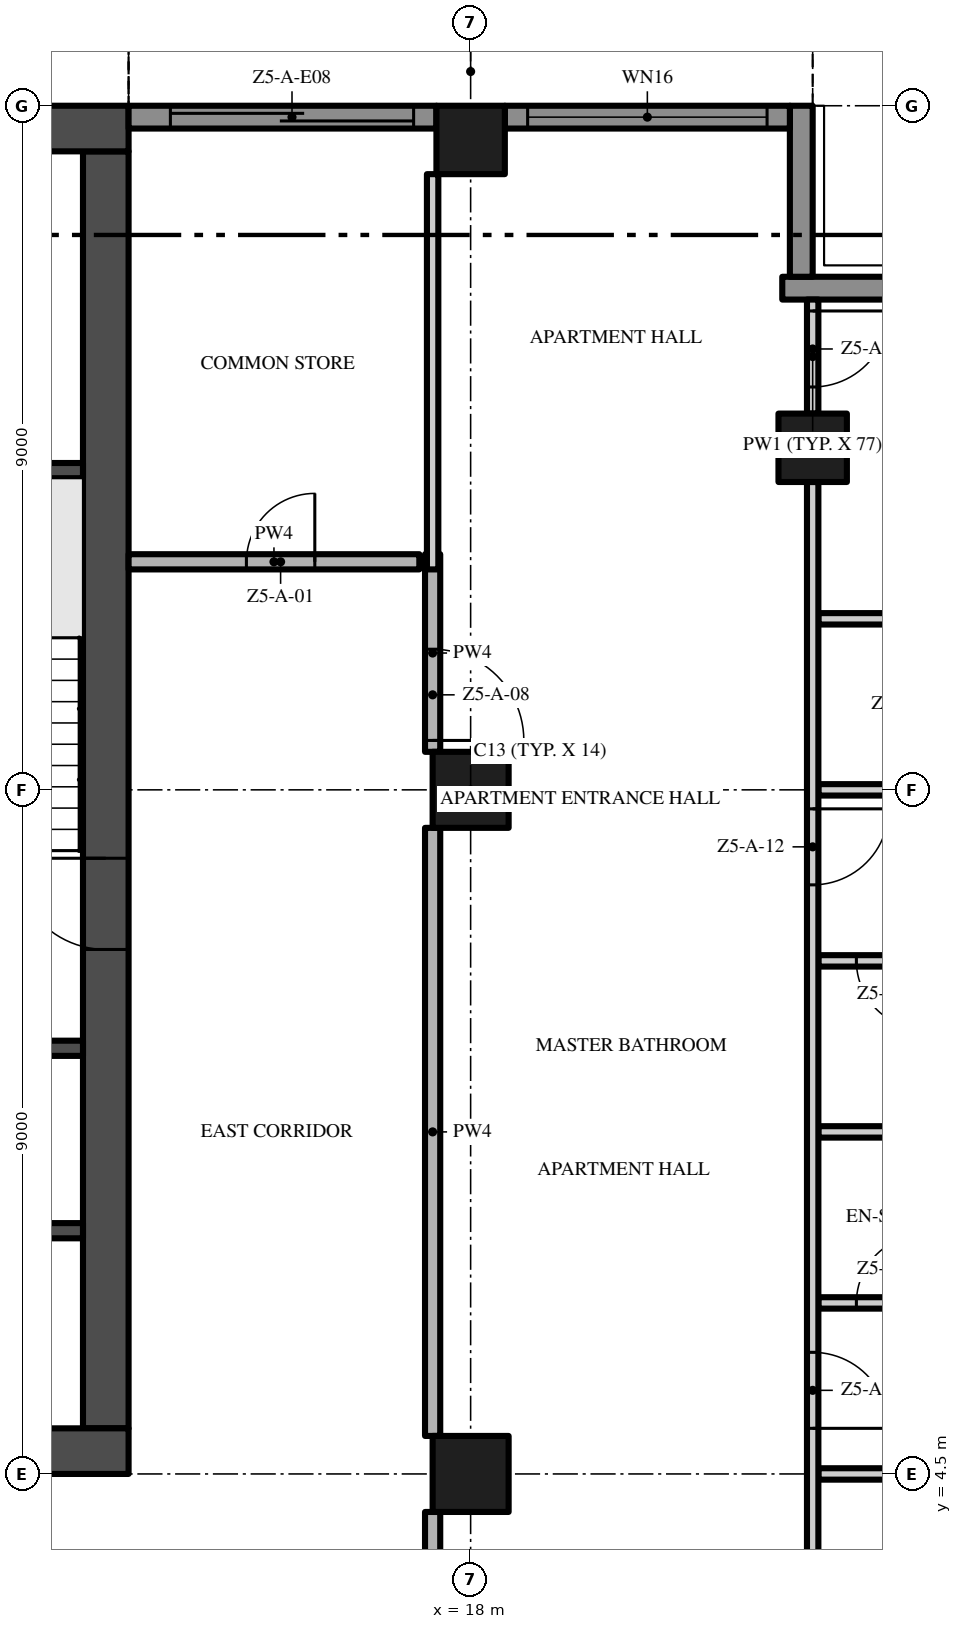
"""IFC4 building model, lengths in metres.
Left out: names, types, materials, properties, quantities, classifications, styles, units other than length and angle.
Written with IfcOpenShell. Run it as: python <this file> out.ifc"""

import sys

from ifc_helpers import new_model, si_unit, direction, frame, frame_2d, origin, origin_2d, place, context, subcontext, project, spatial, rectangle, extrude, element, fill, save


model = new_model("IFC4")
c1 = context("Model", 3, precision=1e-05, world=origin(), true_north=direction((0.0, 1.0)))
c2 = subcontext(c1, "Body", "Model", "MODEL_VIEW")
j1 = project(units=[si_unit("LENGTHUNIT", "METRE"), si_unit("PLANEANGLEUNIT", "RADIAN")], contexts=[c1])
p1 = place(None, origin())
s1 = spatial("IfcSite", under=j1, at=p1, CompositionType="ELEMENT")
p2 = place(p1, origin())
s2 = spatial("IfcBuilding", under=s1, at=p2, CompositionType="ELEMENT")
p3 = place(p2, frame((0.0, 0.0, 238.8)))
s3 = spatial("IfcBuildingStorey", under=s2, at=p3, CompositionType="ELEMENT", Elevation=238.8)
p4 = place(p3, frame((-13.5, 4.8, -0.3), z_axis=(0.0, 0.0, 1.0), x_axis=(1.0, 0.0, 0.0)))
e1 = element("IfcWall", 1, at=p4, inside=s3, PredefinedType="SHEAR", context=c2, shape_type="SweptSolid", body=[
    extrude(rectangle(XDim=27.0, YDim=0.6, at=frame_2d((13.5, 0.0))), origin(), (0.0, 0.0, 1.0), 3.8),
])
p5 = place(p4, frame((12.0, 0.0, 0.3)))
e2 = element("IfcOpeningElement", 2, at=p5, cuts=e1, PredefinedType="OPENING", context=c2, shape_type="SweptSolid", body=[
    extrude(rectangle(XDim=3.0, YDim=2.4, at=frame_2d((1.5, 1.2))), frame((0.0, 0.31, 0.0), z_axis=(0.0, -1.0, 0.0), x_axis=(1.0, 0.0, 0.0)), (0.0, 0.0, 1.0), 0.62),
])
p6 = place(p4, frame((4.9, 0.0, 0.3)))
e3 = element("IfcOpeningElement", 3, at=p6, cuts=e1, PredefinedType="OPENING", context=c2, shape_type="SweptSolid", body=[
    extrude(rectangle(XDim=1.2, YDim=2.2, at=frame_2d((0.6, 1.1))), frame((0.0, 0.31, 0.0), z_axis=(0.0, -1.0, 0.0), x_axis=(1.0, 0.0, 0.0)), (0.0, 0.0, 1.0), 0.62),
])
p7 = place(p4, frame((20.75, 0.0, 0.3)))
e4 = element("IfcOpeningElement", 4, at=p7, cuts=e1, PredefinedType="OPENING", context=c2, shape_type="SweptSolid", body=[
    extrude(rectangle(XDim=1.5, YDim=2.2, at=frame_2d((0.75, 1.1))), frame((0.0, 0.31, 0.0), z_axis=(0.0, -1.0, 0.0), x_axis=(1.0, 0.0, 0.0)), (0.0, 0.0, 1.0), 0.62),
])
p8 = place(p4, frame((17.4, 0.0, 0.3)))
e5 = element("IfcOpeningElement", 5, at=p8, cuts=e1, PredefinedType="OPENING", context=c2, shape_type="SweptSolid", body=[
    extrude(rectangle(XDim=1.2, YDim=2.2, at=frame_2d((0.6, 1.1))), frame((0.0, 0.31, 0.0), z_axis=(0.0, -1.0, 0.0), x_axis=(1.0, 0.0, 0.0)), (0.0, 0.0, 1.0), 0.62),
])
p9 = place(p3, frame((13.2, 5.1, -0.3), z_axis=(0.0, 0.0, 1.0), x_axis=(0.0, 1.0, 0.0)))
e6 = element("IfcWall", 6, at=p9, inside=s3, PredefinedType="SHEAR", context=c2, shape_type="SweptSolid", body=[
    extrude(rectangle(XDim=16.8, YDim=0.6, at=frame_2d((8.4, 0.0))), origin(), (0.0, 0.0, 1.0), 3.8),
])
p10 = place(p9, frame((6.3, 0.0, 0.3)))
e7 = element("IfcOpeningElement", 7, at=p10, cuts=e6, PredefinedType="OPENING", context=c2, shape_type="SweptSolid", body=[
    extrude(rectangle(XDim=1.2, YDim=2.2, at=frame_2d((0.6, 1.1))), frame((0.0, 0.31, 0.0), z_axis=(0.0, -1.0, 0.0), x_axis=(1.0, 0.0, 0.0)), (0.0, 0.0, 1.0), 0.62),
])
p11 = place(p3, frame((13.5, 22.2, -0.3), z_axis=(0.0, 0.0, 1.0), x_axis=(-1.0, 0.0, 0.0)))
e8 = element("IfcWall", 8, at=p11, inside=s3, PredefinedType="SHEAR", context=c2, shape_type="SweptSolid", body=[
    extrude(rectangle(XDim=27.0, YDim=0.6, at=frame_2d((13.5, 0.0))), origin(), (0.0, 0.0, 1.0), 3.8),
])
p12 = place(p3, frame((18.0, 13.5, 0.0), z_axis=(0.0, 0.0, 1.0), x_axis=(1.0, 0.0, 0.0)))
e9 = element("IfcColumn", 9, at=p12, inside=s3, PredefinedType="COLUMN", context=c2, shape_type="SweptSolid", body=[
    extrude(rectangle(XDim=1.0, YDim=1.0, at=origin_2d()), origin(), (0.0, 0.0, 1.0), 3.5),
])
p13 = place(p3, frame((18.0, 22.05, 0.0), z_axis=(0.0, 0.0, 1.0), x_axis=(1.0, 0.0, 0.0)))
e10 = element("IfcColumn", 10, at=p13, inside=s3, PredefinedType="COLUMN", context=c2, shape_type="SweptSolid", body=[
    extrude(rectangle(XDim=0.9, YDim=0.9, at=origin_2d()), origin(), (0.0, 0.0, 1.0), 3.5),
])
p14 = place(p3, frame((18.0, 4.5, 0.0), z_axis=(0.0, 0.0, 1.0), x_axis=(1.0, 0.0, 0.0)))
e11 = element("IfcColumn", 11, at=p14, inside=s3, PredefinedType="COLUMN", context=c2, shape_type="SweptSolid", body=[
    extrude(rectangle(XDim=1.0, YDim=1.0, at=origin_2d()), origin(), (0.0, 0.0, 1.0), 3.5),
])
p15 = place(p3, frame((22.5, 18.0, 0.0), z_axis=(0.0, 0.0, 1.0), x_axis=(1.0, 0.0, 0.0)))
e12 = element("IfcColumn", 12, at=p15, inside=s3, PredefinedType="COLUMN", context=c2, shape_type="SweptSolid", body=[
    extrude(rectangle(XDim=0.9, YDim=0.9, at=origin_2d()), origin(), (0.0, 0.0, 1.0), 3.5),
])
p16 = place(p3, frame((22.1, 20.1, 0.0), z_axis=(0.0, 0.0, 1.0), x_axis=(1.0, 0.0, 0.0)))
e13 = element("IfcWall", 13, at=p16, inside=s3, PredefinedType="SOLIDWALL", context=c2, shape_type="SweptSolid", body=[
    extrude(rectangle(XDim=2.35, YDim=0.3, at=frame_2d((1.175, 0.0))), origin(), (0.0, 0.0, 1.0), 3.5),
])
p17 = place(p3, frame((22.35, 22.5, 0.0), z_axis=(0.0, 0.0, 1.0), x_axis=(0.0, -1.0, 0.0)))
e14 = element("IfcWall", 14, at=p17, inside=s3, PredefinedType="SOLIDWALL", context=c2, shape_type="SweptSolid", body=[
    extrude(rectangle(XDim=2.25, YDim=0.3, at=frame_2d((1.125, 0.0))), origin(), (0.0, 0.0, 1.0), 3.5),
])
p18 = place(p3, frame((18.45, 22.35, 0.0), z_axis=(0.0, 0.0, 1.0), x_axis=(1.0, 0.0, 0.0)))
e15 = element("IfcWall", 15, at=p18, inside=s3, PredefinedType="SOLIDWALL", context=c2, shape_type="SweptSolid", body=[
    extrude(rectangle(XDim=3.75, YDim=0.3, at=frame_2d((1.875, 0.0))), origin(), (0.0, 0.0, 1.0), 3.5),
])
p19 = place(p18, frame((0.3, 0.0, 0.45)))
e16 = element("IfcOpeningElement", 16, at=p19, cuts=e15, PredefinedType="OPENING", context=c2, shape_type="SweptSolid", body=[
    extrude(rectangle(XDim=3.15, YDim=2.65, at=frame_2d((1.575, 1.325))), frame((0.0, 0.16, 0.0), z_axis=(0.0, -1.0, 0.0), x_axis=(1.0, 0.0, 0.0)), (0.0, 0.0, 1.0), 0.32),
])
p20 = place(p3, frame((13.5, 22.35, 0.0), z_axis=(0.0, 0.0, 1.0), x_axis=(1.0, 0.0, 0.0)))
e17 = element("IfcWall", 17, at=p20, inside=s3, PredefinedType="SOLIDWALL", context=c2, shape_type="SweptSolid", body=[
    extrude(rectangle(XDim=4.05, YDim=0.3, at=frame_2d((2.025, 0.0))), origin(), (0.0, 0.0, 1.0), 3.5),
])
p21 = place(p20, frame((0.55, 0.0, 0.0)))
e18 = element("IfcOpeningElement", 18, at=p21, cuts=e17, PredefinedType="OPENING", context=c2, shape_type="SweptSolid", body=[
    extrude(rectangle(XDim=3.2, YDim=2.4, at=frame_2d((1.6, 1.2))), frame((0.0, 0.16, 0.0), z_axis=(0.0, -1.0, 0.0), x_axis=(1.0, 0.0, 0.0)), (0.0, 0.0, 1.0), 0.32),
])
for number, where, z_axis, x_axis in (
    (19, (9.65, 7.7, 0.0), (0.0, 0.0, 1.0), (1.0, 0.0, 0.0)),
    (20, (9.65, 10.1, 0.0), (0.0, 0.0, 1.0), (1.0, 0.0, 0.0)),
    (21, (9.65, 17.7, 0.0), (0.0, 0.0, 1.0), (1.0, 0.0, 0.0)),
):
    element("IfcWall", number, at=place(p3, frame(where, z_axis=z_axis, x_axis=x_axis)), inside=s3, PredefinedType="SHEAR", context=c2, shape_type="SweptSolid", body=[
        extrude(rectangle(XDim=3.25, YDim=0.2, at=frame_2d((1.625, 0.0))), origin(), (0.0, 0.0, 1.0), 3.5),
    ])
p22 = place(p3, frame((22.575, 4.5, 0.0), z_axis=(0.0, 0.0, 1.0), x_axis=(1.0, 0.0, 0.0)))
e22 = element("IfcWall", 22, at=p22, inside=s3, PredefinedType="PARTITIONING", context=c2, shape_type="SweptSolid", body=[
    extrude(rectangle(XDim=3.525, YDim=0.15, at=frame_2d((1.762, 0.0))), origin(), (0.0, 0.0, 1.0), 3.5),
])
p23 = place(p3, frame((22.575, 6.75, 0.0), z_axis=(0.0, 0.0, 1.0), x_axis=(1.0, 0.0, 0.0)))
e23 = element("IfcWall", 23, at=p23, inside=s3, PredefinedType="PARTITIONING", context=c2, shape_type="SweptSolid", body=[
    extrude(rectangle(XDim=1.875, YDim=0.15, at=frame_2d((0.938, 0.0))), origin(), (0.0, 0.0, 1.0), 3.5),
])
p24 = place(p23, frame((0.5, 0.0, 0.0)))
e24 = element("IfcOpeningElement", 24, at=p24, cuts=e23, PredefinedType="OPENING", context=c2, shape_type="SweptSolid", body=[
    extrude(rectangle(XDim=0.9, YDim=2.1, at=frame_2d((0.45, 1.05))), frame((0.0, 0.085, 0.0), z_axis=(0.0, -1.0, 0.0), x_axis=(1.0, 0.0, 0.0)), (0.0, 0.0, 1.0), 0.17),
])
p25 = place(p3, frame((22.575, 9.0, 0.0), z_axis=(0.0, 0.0, 1.0), x_axis=(1.0, 0.0, 0.0)))
e25 = element("IfcWall", 25, at=p25, inside=s3, PredefinedType="PARTITIONING", context=c2, shape_type="SweptSolid", body=[
    extrude(rectangle(XDim=1.875, YDim=0.15, at=frame_2d((0.938, 0.0))), origin(), (0.0, 0.0, 1.0), 3.5),
])
p26 = place(p3, frame((24.45, 11.25, 0.0), z_axis=(0.0, 0.0, 1.0), x_axis=(-1.0, 0.0, 0.0)))
e26 = element("IfcWall", 26, at=p26, inside=s3, PredefinedType="PARTITIONING", context=c2, shape_type="SweptSolid", body=[
    extrude(rectangle(XDim=1.875, YDim=0.15, at=frame_2d((0.938, 0.0))), origin(), (0.0, 0.0, 1.0), 3.5),
])
p27 = place(p26, frame((0.475, 0.0, 0.0)))
e27 = element("IfcOpeningElement", 27, at=p27, cuts=e26, PredefinedType="OPENING", context=c2, shape_type="SweptSolid", body=[
    extrude(rectangle(XDim=0.9, YDim=2.1, at=frame_2d((0.45, 1.05))), frame((0.0, 0.085, 0.0), z_axis=(0.0, -1.0, 0.0), x_axis=(1.0, 0.0, 0.0)), (0.0, 0.0, 1.0), 0.17),
])
p28 = place(p3, frame((22.575, 13.5, 0.0), z_axis=(0.0, 0.0, 1.0), x_axis=(1.0, 0.0, 0.0)))
e28 = element("IfcWall", 28, at=p28, inside=s3, PredefinedType="PARTITIONING", context=c2, shape_type="SweptSolid", body=[
    extrude(rectangle(XDim=3.525, YDim=0.15, at=frame_2d((1.762, 0.0))), origin(), (0.0, 0.0, 1.0), 3.5),
])
p29 = place(p3, frame((22.575, 15.75, 0.0), z_axis=(0.0, 0.0, 1.0), x_axis=(1.0, 0.0, 0.0)))
e29 = element("IfcWall", 29, at=p29, inside=s3, PredefinedType="PARTITIONING", context=c2, shape_type="SweptSolid", body=[
    extrude(rectangle(XDim=1.875, YDim=0.15, at=frame_2d((0.938, 0.0))), origin(), (0.0, 0.0, 1.0), 3.5),
])
p30 = place(p3, frame((13.5, 16.5, 0.0), z_axis=(0.0, 0.0, 1.0), x_axis=(1.0, 0.0, 0.0)))
e30 = element("IfcWall", 30, at=p30, inside=s3, PredefinedType="PARTITIONING", context=c2, shape_type="SweptSolid", body=[
    extrude(rectangle(XDim=3.825, YDim=0.2, at=frame_2d((1.913, 0.0))), origin(), (0.0, 0.0, 1.0), 3.5),
])
p31 = place(p30, frame((1.55, 0.0, 0.0)))
e31 = element("IfcOpeningElement", 31, at=p31, cuts=e30, PredefinedType="OPENING", context=c2, shape_type="SweptSolid", body=[
    extrude(rectangle(XDim=0.9, YDim=2.1, at=frame_2d((0.45, 1.05))), frame((0.0, 0.11, 0.0), z_axis=(0.0, -1.0, 0.0), x_axis=(1.0, 0.0, 0.0)), (0.0, 0.0, 1.0), 0.22),
])
p32 = place(p3, frame((17.5, -0.2, 0.0), z_axis=(0.0, 0.0, 1.0), x_axis=(0.0, 1.0, 0.0)))
e32 = element("IfcWall", 32, at=p32, inside=s3, PredefinedType="PARTITIONING", context=c2, shape_type="SweptSolid", body=[
    extrude(rectangle(XDim=4.2, YDim=0.2, at=frame_2d((2.1, 0.0))), origin(), (0.0, 0.0, 1.0), 3.5),
])
p33 = place(p3, frame((17.5, 5.0, 0.0), z_axis=(0.0, 0.0, 1.0), x_axis=(0.0, 1.0, 0.0)))
e33 = element("IfcWall", 33, at=p33, inside=s3, PredefinedType="PARTITIONING", context=c2, shape_type="SweptSolid", body=[
    extrude(rectangle(XDim=8.0, YDim=0.2, at=frame_2d((4.0, 0.0))), origin(), (0.0, 0.0, 1.0), 3.5),
])
p34 = place(p3, frame((17.5, 16.6, 0.0), z_axis=(0.0, 0.0, 1.0), x_axis=(0.0, -1.0, 0.0)))
e34 = element("IfcWall", 34, at=p34, inside=s3, PredefinedType="PARTITIONING", context=c2, shape_type="SweptSolid", body=[
    extrude(rectangle(XDim=2.6, YDim=0.2, at=frame_2d((1.3, 0.0))), origin(), (0.0, 0.0, 1.0), 3.5),
])
p35 = place(p34, frame((1.25, 0.0, 0.0)))
e35 = element("IfcOpeningElement", 35, at=p35, cuts=e34, PredefinedType="OPENING", context=c2, shape_type="SweptSolid", body=[
    extrude(rectangle(XDim=1.2, YDim=2.4, at=frame_2d((0.6, 1.2))), frame((0.0, 0.11, 0.0), z_axis=(0.0, -1.0, 0.0), x_axis=(1.0, 0.0, 0.0)), (0.0, 0.0, 1.0), 0.22),
])
p36 = place(p3, frame((17.5, 16.4, 0.0), z_axis=(0.0, 0.0, 1.0), x_axis=(0.0, 1.0, 0.0)))
e36 = element("IfcWall", 36, at=p36, inside=s3, PredefinedType="PARTITIONING", context=c2, shape_type="SweptSolid", body=[
    extrude(rectangle(XDim=5.2, YDim=0.15, at=frame_2d((2.6, 0.0))), origin(), (0.0, 0.0, 1.0), 3.5),
])
p37 = place(p3, frame((22.5, 17.55, 0.0), z_axis=(0.0, 0.0, 1.0), x_axis=(0.0, -1.0, 0.0)))
e37 = element("IfcWall", 37, at=p37, inside=s3, PredefinedType="PARTITIONING", context=c2, shape_type="SweptSolid", body=[
    extrude(rectangle(XDim=17.45, YDim=0.15, at=frame_2d((8.725, 0.0))), origin(), (0.0, 0.0, 1.0), 3.5),
])
p38 = place(p37, frame((14.8, 0.0, 0.0)))
e38 = element("IfcOpeningElement", 38, at=p38, cuts=e37, PredefinedType="OPENING", context=c2, shape_type="SweptSolid", body=[
    extrude(rectangle(XDim=1.0, YDim=2.4, at=frame_2d((0.5, 1.2))), frame((0.0, 0.085, 0.0), z_axis=(0.0, -1.0, 0.0), x_axis=(1.0, 0.0, 0.0)), (0.0, 0.0, 1.0), 0.17),
])
p39 = place(p37, frame((11.45, 0.0, 0.0)))
e39 = element("IfcOpeningElement", 39, at=p39, cuts=e37, PredefinedType="OPENING", context=c2, shape_type="SweptSolid", body=[
    extrude(rectangle(XDim=1.0, YDim=2.4, at=frame_2d((0.5, 1.2))), frame((0.0, 0.085, 0.0), z_axis=(0.0, -1.0, 0.0), x_axis=(1.0, 0.0, 0.0)), (0.0, 0.0, 1.0), 0.17),
])
p40 = place(p37, frame((4.3, 0.0, 0.0)))
e40 = element("IfcOpeningElement", 40, at=p40, cuts=e37, PredefinedType="OPENING", context=c2, shape_type="SweptSolid", body=[
    extrude(rectangle(XDim=1.0, YDim=2.4, at=frame_2d((0.5, 1.2))), frame((0.0, 0.085, 0.0), z_axis=(0.0, -1.0, 0.0), x_axis=(1.0, 0.0, 0.0)), (0.0, 0.0, 1.0), 0.17),
])
p41 = place(p3, frame((22.5, 19.95, 0.0), z_axis=(0.0, 0.0, 1.0), x_axis=(0.0, -1.0, 0.0)))
e41 = element("IfcWall", 41, at=p41, inside=s3, PredefinedType="PARTITIONING", context=c2, shape_type="SweptSolid", body=[
    extrude(rectangle(XDim=1.5, YDim=0.15, at=frame_2d((0.75, 0.0))), origin(), (0.0, 0.0, 1.0), 3.5),
])
p42 = place(p41, frame((0.15, 0.0, 0.0)))
e42 = element("IfcOpeningElement", 42, at=p42, cuts=e41, PredefinedType="OPENING", context=c2, shape_type="SweptSolid", body=[
    extrude(rectangle(XDim=1.0, YDim=2.4, at=frame_2d((0.5, 1.2))), frame((0.0, 0.085, 0.0), z_axis=(0.0, -1.0, 0.0), x_axis=(1.0, 0.0, 0.0)), (0.0, 0.0, 1.0), 0.17),
])
p43 = place(p19, origin())
e43 = element("IfcWindow", 43, at=p43, inside=s3, PartitioningType="SINGLE_PANEL", PredefinedType="WINDOW", context=c2, shape_type="SweptSolid", body=[
    extrude(rectangle(XDim=3.15, YDim=2.65, at=frame_2d((1.575, 1.325))), frame((0.0, 0.03, 0.0), z_axis=(0.0, -1.0, 0.0), x_axis=(1.0, 0.0, 0.0)), (0.0, 0.0, 1.0), 0.06),
])
fill(e16, e43)
p44 = place(p21, origin())
e44 = element("IfcDoor", 44, at=p44, inside=s3, OperationType="SINGLE_SWING_LEFT", PredefinedType="DOOR", context=c2, shape_type="SweptSolid", body=[
    extrude(rectangle(XDim=3.2, YDim=2.4, at=frame_2d((1.6, 1.2))), frame((0.0, 0.025, 0.0), z_axis=(0.0, -1.0, 0.0), x_axis=(1.0, 0.0, 0.0)), (0.0, 0.0, 1.0), 0.05),
])
fill(e18, e44)
p45 = place(p10, frame((1.2, 0.0, 0.0), z_axis=(0.0, 0.0, 1.0), x_axis=(-1.0, 0.0, 0.0)))
e45 = element("IfcDoor", 45, at=p45, inside=s3, OperationType="SINGLE_SWING_LEFT", PredefinedType="DOOR", context=c2, shape_type="SweptSolid", body=[
    extrude(rectangle(XDim=1.2, YDim=2.2, at=frame_2d((0.6, 1.1))), frame((0.0, 0.025, 0.0), z_axis=(0.0, -1.0, 0.0), x_axis=(1.0, 0.0, 0.0)), (0.0, 0.0, 1.0), 0.05),
])
fill(e7, e45)
p46 = place(p31, origin())
e46 = element("IfcDoor", 46, at=p46, inside=s3, OperationType="SINGLE_SWING_RIGHT", PredefinedType="DOOR", context=c2, shape_type="SweptSolid", body=[
    extrude(rectangle(XDim=0.9, YDim=2.1, at=frame_2d((0.45, 1.05))), frame((0.0, 0.025, 0.0), z_axis=(0.0, -1.0, 0.0), x_axis=(1.0, 0.0, 0.0)), (0.0, 0.0, 1.0), 0.05),
])
fill(e31, e46)
p47 = place(p35, origin())
e47 = element("IfcDoor", 47, at=p47, inside=s3, OperationType="SINGLE_SWING_RIGHT", PredefinedType="DOOR", context=c2, shape_type="SweptSolid", body=[
    extrude(rectangle(XDim=1.2, YDim=2.4, at=frame_2d((0.6, 1.2))), frame((0.0, 0.025, 0.0), z_axis=(0.0, -1.0, 0.0), x_axis=(1.0, 0.0, 0.0)), (0.0, 0.0, 1.0), 0.05),
])
fill(e35, e47)
p48 = place(p39, origin())
e48 = element("IfcDoor", 48, at=p48, inside=s3, OperationType="SINGLE_SWING_RIGHT", PredefinedType="DOOR", context=c2, shape_type="SweptSolid", body=[
    extrude(rectangle(XDim=1.0, YDim=2.4, at=frame_2d((0.5, 1.2))), frame((0.0, 0.025, 0.0), z_axis=(0.0, -1.0, 0.0), x_axis=(1.0, 0.0, 0.0)), (0.0, 0.0, 1.0), 0.05),
])
fill(e39, e48)
p49 = place(p24, origin())
e49 = element("IfcDoor", 49, at=p49, inside=s3, OperationType="SINGLE_SWING_RIGHT", PredefinedType="DOOR", context=c2, shape_type="SweptSolid", body=[
    extrude(rectangle(XDim=0.9, YDim=2.1, at=frame_2d((0.45, 1.05))), frame((0.0, 0.025, 0.0), z_axis=(0.0, -1.0, 0.0), x_axis=(1.0, 0.0, 0.0)), (0.0, 0.0, 1.0), 0.05),
])
fill(e24, e49)
p50 = place(p40, origin())
e50 = element("IfcDoor", 50, at=p50, inside=s3, OperationType="SINGLE_SWING_LEFT", PredefinedType="DOOR", context=c2, shape_type="SweptSolid", body=[
    extrude(rectangle(XDim=1.0, YDim=2.4, at=frame_2d((0.5, 1.2))), frame((0.0, 0.025, 0.0), z_axis=(0.0, -1.0, 0.0), x_axis=(1.0, 0.0, 0.0)), (0.0, 0.0, 1.0), 0.05),
])
fill(e40, e50)
p51 = place(p27, origin())
e51 = element("IfcDoor", 51, at=p51, inside=s3, OperationType="SINGLE_SWING_LEFT", PredefinedType="DOOR", context=c2, shape_type="SweptSolid", body=[
    extrude(rectangle(XDim=0.9, YDim=2.1, at=frame_2d((0.45, 1.05))), frame((0.0, 0.025, 0.0), z_axis=(0.0, -1.0, 0.0), x_axis=(1.0, 0.0, 0.0)), (0.0, 0.0, 1.0), 0.05),
])
fill(e27, e51)
p52 = place(p42, origin())
e52 = element("IfcDoor", 52, at=p52, inside=s3, OperationType="SINGLE_SWING_LEFT", PredefinedType="DOOR", context=c2, shape_type="SweptSolid", body=[
    extrude(rectangle(XDim=1.0, YDim=2.4, at=frame_2d((0.5, 1.2))), frame((0.0, 0.025, 0.0), z_axis=(0.0, -1.0, 0.0), x_axis=(1.0, 0.0, 0.0)), (0.0, 0.0, 1.0), 0.05),
])
fill(e42, e52)
save(model, sys.argv[1])
